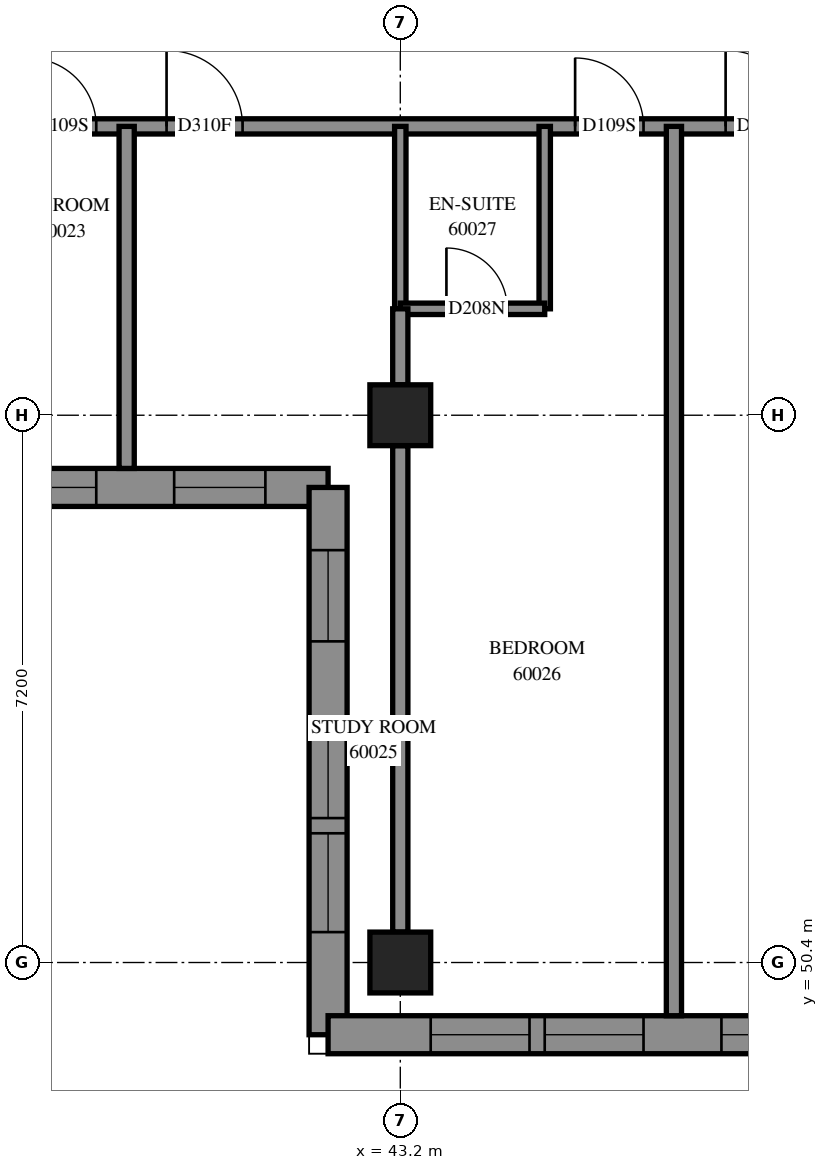
"""IFC4 building model, lengths in metres.
Left out: names, types, materials, properties, quantities, classifications, styles, units other than length and angle.
Written with IfcOpenShell. Run it as: python <this file> out.ifc"""

import sys

from ifc_helpers import new_model, si_unit, direction, frame, frame_2d, origin, origin_2d, place, context, subcontext, project, spatial, polyline, rectangle, outline, extrude, element, fill, save


model = new_model("IFC4")
c1 = context("Model", 3, precision=1e-05, world=origin(), true_north=direction((0.0, 1.0)))
c2 = subcontext(c1, "Body", "Model", "MODEL_VIEW")
j1 = project(units=[si_unit("LENGTHUNIT", "METRE"), si_unit("PLANEANGLEUNIT", "RADIAN")], contexts=[c1])
p1 = place(None, origin())
s1 = spatial("IfcSite", under=j1, at=p1, CompositionType="ELEMENT")
p2 = place(p1, origin())
s2 = spatial("IfcBuilding", under=s1, at=p2, CompositionType="ELEMENT")
p3 = place(p2, frame((0.0, 0.0, 220.2)))
s3 = spatial("IfcBuildingStorey", under=s2, at=p3, CompositionType="ELEMENT", Elevation=220.2)
for number, where, z_axis, x_axis in (
    (1, (43.2, 50.4, 0.0), (0.0, 0.0, 1.0), (1.0, 0.0, 0.0)),
    (2, (43.2, 57.6, 0.0), (0.0, 0.0, 1.0), (1.0, 0.0, 0.0)),
):
    element("IfcColumn", number, at=place(p3, frame(where, z_axis=z_axis, x_axis=x_axis)), inside=s3, PredefinedType="COLUMN", context=c2, shape_type="SweptSolid", body=[
        extrude(rectangle(XDim=0.8, YDim=0.8, at=origin_2d()), origin(), (0.0, 0.0, 1.0), 3.1),
    ])
p4 = place(p3, frame((35.05, 56.65, 0.0), z_axis=(0.0, 0.0, 1.0), x_axis=(1.0, 0.0, 0.0)))
e3 = element("IfcWall", 3, at=p4, inside=s3, PredefinedType="SOLIDWALL", context=c2, shape_type="SweptSolid", body=[
    extrude(outline(polyline([(-0.25, -0.25), (6.95, -0.25), (7.45, 0.25), (0.25, 0.25), (-0.25, -0.25)])), origin(), (0.0, 0.0, 1.0), 3.1),
])
p5 = place(p4, frame((1.35, 0.0, 0.45)))
e4 = element("IfcOpeningElement", 4, at=p5, cuts=e3, PredefinedType="OPENING", context=c2, shape_type="SweptSolid", body=[
    extrude(rectangle(XDim=1.3, YDim=2.5, at=frame_2d((0.65, 1.25))), frame((0.0, 0.26, 0.0), z_axis=(0.0, -1.0, 0.0), x_axis=(1.0, 0.0, 0.0)), (0.0, 0.0, 1.0), 0.52),
])
p6 = place(p4, frame((2.85, 0.0, 0.45)))
e5 = element("IfcOpeningElement", 5, at=p6, cuts=e3, PredefinedType="OPENING", context=c2, shape_type="SweptSolid", body=[
    extrude(rectangle(XDim=1.3, YDim=2.5, at=frame_2d((0.65, 1.25))), frame((0.0, 0.26, 0.0), z_axis=(0.0, -1.0, 0.0), x_axis=(1.0, 0.0, 0.0)), (0.0, 0.0, 1.0), 0.52),
])
p7 = place(p4, frame((5.175, 0.0, 0.45)))
e6 = element("IfcOpeningElement", 6, at=p7, cuts=e3, PredefinedType="OPENING", context=c2, shape_type="SweptSolid", body=[
    extrude(rectangle(XDim=1.2, YDim=2.5, at=frame_2d((0.6, 1.25))), frame((0.0, 0.26, 0.0), z_axis=(0.0, -1.0, 0.0), x_axis=(1.0, 0.0, 0.0)), (0.0, 0.0, 1.0), 0.52),
])
p8 = place(p3, frame((42.25, 56.65, 0.0), z_axis=(0.0, 0.0, 1.0), x_axis=(0.0, -1.0, 0.0)))
e7 = element("IfcWall", 7, at=p8, inside=s3, PredefinedType="SOLIDWALL", context=c2, shape_type="SweptSolid", body=[
    extrude(outline(polyline([(0.25, -0.25), (7.45, -0.25), (6.95, 0.25), (-0.25, 0.25), (0.25, -0.25)])), origin(), (0.0, 0.0, 1.0), 3.1),
])
p9 = place(p8, frame((3.05, 0.0, 0.45)))
e8 = element("IfcOpeningElement", 8, at=p9, cuts=e7, PredefinedType="OPENING", context=c2, shape_type="SweptSolid", body=[
    extrude(rectangle(XDim=1.3, YDim=2.5, at=frame_2d((0.65, 1.25))), frame((0.0, 0.26, 0.0), z_axis=(0.0, -1.0, 0.0), x_axis=(1.0, 0.0, 0.0)), (0.0, 0.0, 1.0), 0.52),
])
p10 = place(p8, frame((4.55, 0.0, 0.45)))
e9 = element("IfcOpeningElement", 9, at=p10, cuts=e7, PredefinedType="OPENING", context=c2, shape_type="SweptSolid", body=[
    extrude(rectangle(XDim=1.3, YDim=2.5, at=frame_2d((0.65, 1.25))), frame((0.0, 0.26, 0.0), z_axis=(0.0, -1.0, 0.0), x_axis=(1.0, 0.0, 0.0)), (0.0, 0.0, 1.0), 0.52),
])
p11 = place(p8, frame((0.825, 0.0, 0.45)))
e10 = element("IfcOpeningElement", 10, at=p11, cuts=e7, PredefinedType="OPENING", context=c2, shape_type="SweptSolid", body=[
    extrude(rectangle(XDim=1.2, YDim=2.5, at=frame_2d((0.6, 1.25))), frame((0.0, 0.26, 0.0), z_axis=(0.0, -1.0, 0.0), x_axis=(1.0, 0.0, 0.0)), (0.0, 0.0, 1.0), 0.52),
])
p12 = place(p3, frame((42.25, 49.45, 0.0), z_axis=(0.0, 0.0, 1.0), x_axis=(1.0, 0.0, 0.0)))
e11 = element("IfcWall", 11, at=p12, inside=s3, PredefinedType="SOLIDWALL", context=c2, shape_type="SweptSolid", body=[
    extrude(outline(polyline([(-0.25, -0.25), (6.95, -0.25), (7.45, 0.25), (0.25, 0.25), (-0.25, -0.25)])), origin(), (0.0, 0.0, 1.0), 3.1),
])
p13 = place(p12, frame((1.35, 0.0, 0.45)))
e12 = element("IfcOpeningElement", 12, at=p13, cuts=e11, PredefinedType="OPENING", context=c2, shape_type="SweptSolid", body=[
    extrude(rectangle(XDim=1.3, YDim=2.5, at=frame_2d((0.65, 1.25))), frame((0.0, 0.26, 0.0), z_axis=(0.0, -1.0, 0.0), x_axis=(1.0, 0.0, 0.0)), (0.0, 0.0, 1.0), 0.52),
])
p14 = place(p12, frame((2.85, 0.0, 0.45)))
e13 = element("IfcOpeningElement", 13, at=p14, cuts=e11, PredefinedType="OPENING", context=c2, shape_type="SweptSolid", body=[
    extrude(rectangle(XDim=1.3, YDim=2.5, at=frame_2d((0.65, 1.25))), frame((0.0, 0.26, 0.0), z_axis=(0.0, -1.0, 0.0), x_axis=(1.0, 0.0, 0.0)), (0.0, 0.0, 1.0), 0.52),
])
p15 = place(p12, frame((5.175, 0.0, 0.45)))
e14 = element("IfcOpeningElement", 14, at=p15, cuts=e11, PredefinedType="OPENING", context=c2, shape_type="SweptSolid", body=[
    extrude(rectangle(XDim=1.2, YDim=2.5, at=frame_2d((0.6, 1.25))), frame((0.0, 0.26, 0.0), z_axis=(0.0, -1.0, 0.0), x_axis=(1.0, 0.0, 0.0)), (0.0, 0.0, 1.0), 0.52),
])
p16 = place(p3, frame((36.0, 61.4, 0.0), z_axis=(0.0, 0.0, 1.0), x_axis=(1.0, 0.0, 0.0)))
e15 = element("IfcWall", 15, at=p16, inside=s3, PredefinedType="PARTITIONING", context=c2, shape_type="SweptSolid", body=[
    extrude(rectangle(XDim=17.0, YDim=0.2, at=frame_2d((8.5, 0.0))), origin(), (0.0, 0.0, 1.0), 3.1),
])
p17 = place(p16, frame((2.3, 0.0, 0.0)))
e16 = element("IfcOpeningElement", 16, at=p17, cuts=e15, PredefinedType="OPENING", context=c2, shape_type="SweptSolid", body=[
    extrude(rectangle(XDim=0.9, YDim=2.1, at=frame_2d((0.45, 1.05))), frame((0.0, 0.11, 0.0), z_axis=(0.0, -1.0, 0.0), x_axis=(1.0, 0.0, 0.0)), (0.0, 0.0, 1.0), 0.22),
])
p18 = place(p16, frame((4.125, 0.0, 0.0)))
e17 = element("IfcOpeningElement", 17, at=p18, cuts=e15, PredefinedType="OPENING", context=c2, shape_type="SweptSolid", body=[
    extrude(rectangle(XDim=1.0, YDim=2.1, at=frame_2d((0.5, 1.05))), frame((0.0, 0.11, 0.0), z_axis=(0.0, -1.0, 0.0), x_axis=(1.0, 0.0, 0.0)), (0.0, 0.0, 1.0), 0.22),
])
p19 = place(p16, frame((9.5, 0.0, 0.0)))
e18 = element("IfcOpeningElement", 18, at=p19, cuts=e15, PredefinedType="OPENING", context=c2, shape_type="SweptSolid", body=[
    extrude(rectangle(XDim=0.9, YDim=2.1, at=frame_2d((0.45, 1.05))), frame((0.0, 0.11, 0.0), z_axis=(0.0, -1.0, 0.0), x_axis=(1.0, 0.0, 0.0)), (0.0, 0.0, 1.0), 0.22),
])
p20 = place(p16, frame((11.48, 0.0, 0.0)))
e19 = element("IfcOpeningElement", 19, at=p20, cuts=e15, PredefinedType="OPENING", context=c2, shape_type="SweptSolid", body=[
    extrude(rectangle(XDim=1.0, YDim=2.1, at=frame_2d((0.5, 1.05))), frame((0.0, 0.11, 0.0), z_axis=(0.0, -1.0, 0.0), x_axis=(1.0, 0.0, 0.0)), (0.0, 0.0, 1.0), 0.22),
])
p21 = place(p16, frame((15.805, 0.0, 0.0)))
e20 = element("IfcOpeningElement", 20, at=p21, cuts=e15, PredefinedType="OPENING", context=c2, shape_type="SweptSolid", body=[
    extrude(rectangle(XDim=1.0, YDim=2.1, at=frame_2d((0.5, 1.05))), frame((0.0, 0.11, 0.0), z_axis=(0.0, -1.0, 0.0), x_axis=(1.0, 0.0, 0.0)), (0.0, 0.0, 1.0), 0.22),
])
p22 = place(p3, frame((46.8, 49.7, 0.0), z_axis=(0.0, 0.0, 1.0), x_axis=(0.0, 1.0, 0.0)))
e21 = element("IfcWall", 21, at=p22, inside=s3, PredefinedType="PARTITIONING", context=c2, shape_type="SweptSolid", body=[
    extrude(rectangle(XDim=11.7, YDim=0.2, at=frame_2d((5.85, 0.0))), origin(), (0.0, 0.0, 1.0), 3.1),
])
p23 = place(p3, frame((43.2, 50.8, 0.0), z_axis=(0.0, 0.0, 1.0), x_axis=(0.0, 1.0, 0.0)))
e22 = element("IfcWall", 22, at=p23, inside=s3, PredefinedType="PARTITIONING", context=c2, shape_type="SweptSolid", body=[
    extrude(rectangle(XDim=6.4, YDim=0.2, at=frame_2d((3.2, 0.0))), origin(), (0.0, 0.0, 1.0), 2.6),
])
p24 = place(p3, frame((39.6, 56.9, 0.0), z_axis=(0.0, 0.0, 1.0), x_axis=(0.0, 1.0, 0.0)))
e23 = element("IfcWall", 23, at=p24, inside=s3, PredefinedType="PARTITIONING", context=c2, shape_type="SweptSolid", body=[
    extrude(rectangle(XDim=4.5, YDim=0.2, at=frame_2d((2.25, 0.0))), origin(), (0.0, 0.0, 1.0), 3.1),
])
for number, where, z_axis, x_axis in (
    (24, (45.1, 59.0, 0.0), (0.0, 0.0, 1.0), (0.0, 1.0, 0.0)),
    (25, (43.2, 59.0, 0.0), (0.0, 0.0, 1.0), (0.0, 1.0, 0.0)),
):
    element("IfcWall", number, at=place(p3, frame(where, z_axis=z_axis, x_axis=x_axis)), inside=s3, PredefinedType="PARTITIONING", context=c2, shape_type="SweptSolid", body=[
        extrude(rectangle(XDim=2.4, YDim=0.15, at=frame_2d((1.2, 0.0))), origin(), (0.0, 0.0, 1.0), 3.1),
    ])
p25 = place(p3, frame((43.2, 59.0, 0.0), z_axis=(0.0, 0.0, 1.0), x_axis=(1.0, 0.0, 0.0)))
e26 = element("IfcWall", 26, at=p25, inside=s3, PredefinedType="PARTITIONING", context=c2, shape_type="SweptSolid", body=[
    extrude(rectangle(XDim=1.9, YDim=0.15, at=frame_2d((0.95, 0.0))), origin(), (0.0, 0.0, 1.0), 3.1),
])
p26 = place(p25, frame((0.607, 0.0, 0.0)))
e27 = element("IfcOpeningElement", 27, at=p26, cuts=e26, PredefinedType="OPENING", context=c2, shape_type="SweptSolid", body=[
    extrude(rectangle(XDim=0.8, YDim=2.1, at=frame_2d((0.4, 1.05))), frame((0.0, 0.085, 0.0), z_axis=(0.0, -1.0, 0.0), x_axis=(1.0, 0.0, 0.0)), (0.0, 0.0, 1.0), 0.17),
])
p27 = place(p3, frame((43.2, 58.0, 0.0), z_axis=(0.0, 0.0, 1.0), x_axis=(0.0, 1.0, 0.0)))
e28 = element("IfcWall", 28, at=p27, inside=s3, PredefinedType="PARTITIONING", context=c2, shape_type="SweptSolid", body=[
    extrude(rectangle(XDim=1.0, YDim=0.2, at=frame_2d((0.5, 0.0))), origin(), (0.0, 0.0, 1.0), 3.1),
])
p28 = place(p6, origin())
e29 = element("IfcWindow", 29, at=p28, inside=s3, PartitioningType="SINGLE_PANEL", PredefinedType="WINDOW", context=c2, shape_type="SweptSolid", body=[
    extrude(rectangle(XDim=1.3, YDim=2.5, at=frame_2d((0.65, 1.25))), frame((0.0, 0.18, 0.0), z_axis=(0.0, -1.0, 0.0), x_axis=(1.0, 0.0, 0.0)), (0.0, 0.0, 1.0), 0.06),
])
fill(e5, e29)
p29 = place(p7, origin())
e30 = element("IfcWindow", 30, at=p29, inside=s3, PartitioningType="SINGLE_PANEL", PredefinedType="WINDOW", context=c2, shape_type="SweptSolid", body=[
    extrude(rectangle(XDim=1.2, YDim=2.5, at=frame_2d((0.6, 1.25))), frame((0.0, 0.18, 0.0), z_axis=(0.0, -1.0, 0.0), x_axis=(1.0, 0.0, 0.0)), (0.0, 0.0, 1.0), 0.06),
])
fill(e6, e30)
p30 = place(p9, origin())
e31 = element("IfcWindow", 31, at=p30, inside=s3, PartitioningType="SINGLE_PANEL", PredefinedType="WINDOW", context=c2, shape_type="SweptSolid", body=[
    extrude(rectangle(XDim=1.3, YDim=2.5, at=frame_2d((0.65, 1.25))), frame((0.0, 0.18, 0.0), z_axis=(0.0, -1.0, 0.0), x_axis=(1.0, 0.0, 0.0)), (0.0, 0.0, 1.0), 0.06),
])
fill(e8, e31)
p31 = place(p10, origin())
e32 = element("IfcWindow", 32, at=p31, inside=s3, PartitioningType="SINGLE_PANEL", PredefinedType="WINDOW", context=c2, shape_type="SweptSolid", body=[
    extrude(rectangle(XDim=1.3, YDim=2.5, at=frame_2d((0.65, 1.25))), frame((0.0, 0.18, 0.0), z_axis=(0.0, -1.0, 0.0), x_axis=(1.0, 0.0, 0.0)), (0.0, 0.0, 1.0), 0.06),
])
fill(e9, e32)
p32 = place(p11, origin())
e33 = element("IfcWindow", 33, at=p32, inside=s3, PartitioningType="SINGLE_PANEL", PredefinedType="WINDOW", context=c2, shape_type="SweptSolid", body=[
    extrude(rectangle(XDim=1.2, YDim=2.5, at=frame_2d((0.6, 1.25))), frame((0.0, 0.18, 0.0), z_axis=(0.0, -1.0, 0.0), x_axis=(1.0, 0.0, 0.0)), (0.0, 0.0, 1.0), 0.06),
])
fill(e10, e33)
p33 = place(p13, origin())
e34 = element("IfcWindow", 34, at=p33, inside=s3, PartitioningType="SINGLE_PANEL", PredefinedType="WINDOW", context=c2, shape_type="SweptSolid", body=[
    extrude(rectangle(XDim=1.3, YDim=2.5, at=frame_2d((0.65, 1.25))), frame((0.0, 0.18, 0.0), z_axis=(0.0, -1.0, 0.0), x_axis=(1.0, 0.0, 0.0)), (0.0, 0.0, 1.0), 0.06),
])
fill(e12, e34)
p34 = place(p14, origin())
e35 = element("IfcWindow", 35, at=p34, inside=s3, PartitioningType="SINGLE_PANEL", PredefinedType="WINDOW", context=c2, shape_type="SweptSolid", body=[
    extrude(rectangle(XDim=1.3, YDim=2.5, at=frame_2d((0.65, 1.25))), frame((0.0, 0.18, 0.0), z_axis=(0.0, -1.0, 0.0), x_axis=(1.0, 0.0, 0.0)), (0.0, 0.0, 1.0), 0.06),
])
fill(e13, e35)
p35 = place(p15, origin())
e36 = element("IfcWindow", 36, at=p35, inside=s3, PartitioningType="SINGLE_PANEL", PredefinedType="WINDOW", context=c2, shape_type="SweptSolid", body=[
    extrude(rectangle(XDim=1.2, YDim=2.5, at=frame_2d((0.6, 1.25))), frame((0.0, 0.18, 0.0), z_axis=(0.0, -1.0, 0.0), x_axis=(1.0, 0.0, 0.0)), (0.0, 0.0, 1.0), 0.06),
])
fill(e14, e36)
p36 = place(p17, origin())
e37 = element("IfcDoor", 37, at=p36, inside=s3, OperationType="SINGLE_SWING_LEFT", PredefinedType="DOOR", context=c2, shape_type="SweptSolid", body=[
    extrude(rectangle(XDim=0.9, YDim=2.1, at=frame_2d((0.45, 1.05))), frame((0.0, 0.025, 0.0), z_axis=(0.0, -1.0, 0.0), x_axis=(1.0, 0.0, 0.0)), (0.0, 0.0, 1.0), 0.05),
])
fill(e16, e37)
p37 = place(p18, origin())
e38 = element("IfcDoor", 38, at=p37, inside=s3, OperationType="SINGLE_SWING_RIGHT", PredefinedType="DOOR", context=c2, shape_type="SweptSolid", body=[
    extrude(rectangle(XDim=1.0, YDim=2.1, at=frame_2d((0.5, 1.05))), frame((0.0, 0.025, 0.0), z_axis=(0.0, -1.0, 0.0), x_axis=(1.0, 0.0, 0.0)), (0.0, 0.0, 1.0), 0.05),
])
fill(e17, e38)
p38 = place(p19, origin())
e39 = element("IfcDoor", 39, at=p38, inside=s3, OperationType="SINGLE_SWING_LEFT", PredefinedType="DOOR", context=c2, shape_type="SweptSolid", body=[
    extrude(rectangle(XDim=0.9, YDim=2.1, at=frame_2d((0.45, 1.05))), frame((0.0, 0.025, 0.0), z_axis=(0.0, -1.0, 0.0), x_axis=(1.0, 0.0, 0.0)), (0.0, 0.0, 1.0), 0.05),
])
fill(e18, e39)
p39 = place(p26, origin())
e40 = element("IfcDoor", 40, at=p39, inside=s3, OperationType="SINGLE_SWING_RIGHT", PredefinedType="DOOR", context=c2, shape_type="SweptSolid", body=[
    extrude(rectangle(XDim=0.8, YDim=2.1, at=frame_2d((0.4, 1.05))), frame((0.0, 0.025, 0.0), z_axis=(0.0, -1.0, 0.0), x_axis=(1.0, 0.0, 0.0)), (0.0, 0.0, 1.0), 0.05),
])
fill(e27, e40)
p40 = place(p20, origin())
e41 = element("IfcDoor", 41, at=p40, inside=s3, OperationType="SINGLE_SWING_RIGHT", PredefinedType="DOOR", context=c2, shape_type="SweptSolid", body=[
    extrude(rectangle(XDim=1.0, YDim=2.1, at=frame_2d((0.5, 1.05))), frame((0.0, 0.025, 0.0), z_axis=(0.0, -1.0, 0.0), x_axis=(1.0, 0.0, 0.0)), (0.0, 0.0, 1.0), 0.05),
])
fill(e19, e41)
save(model, sys.argv[1])
